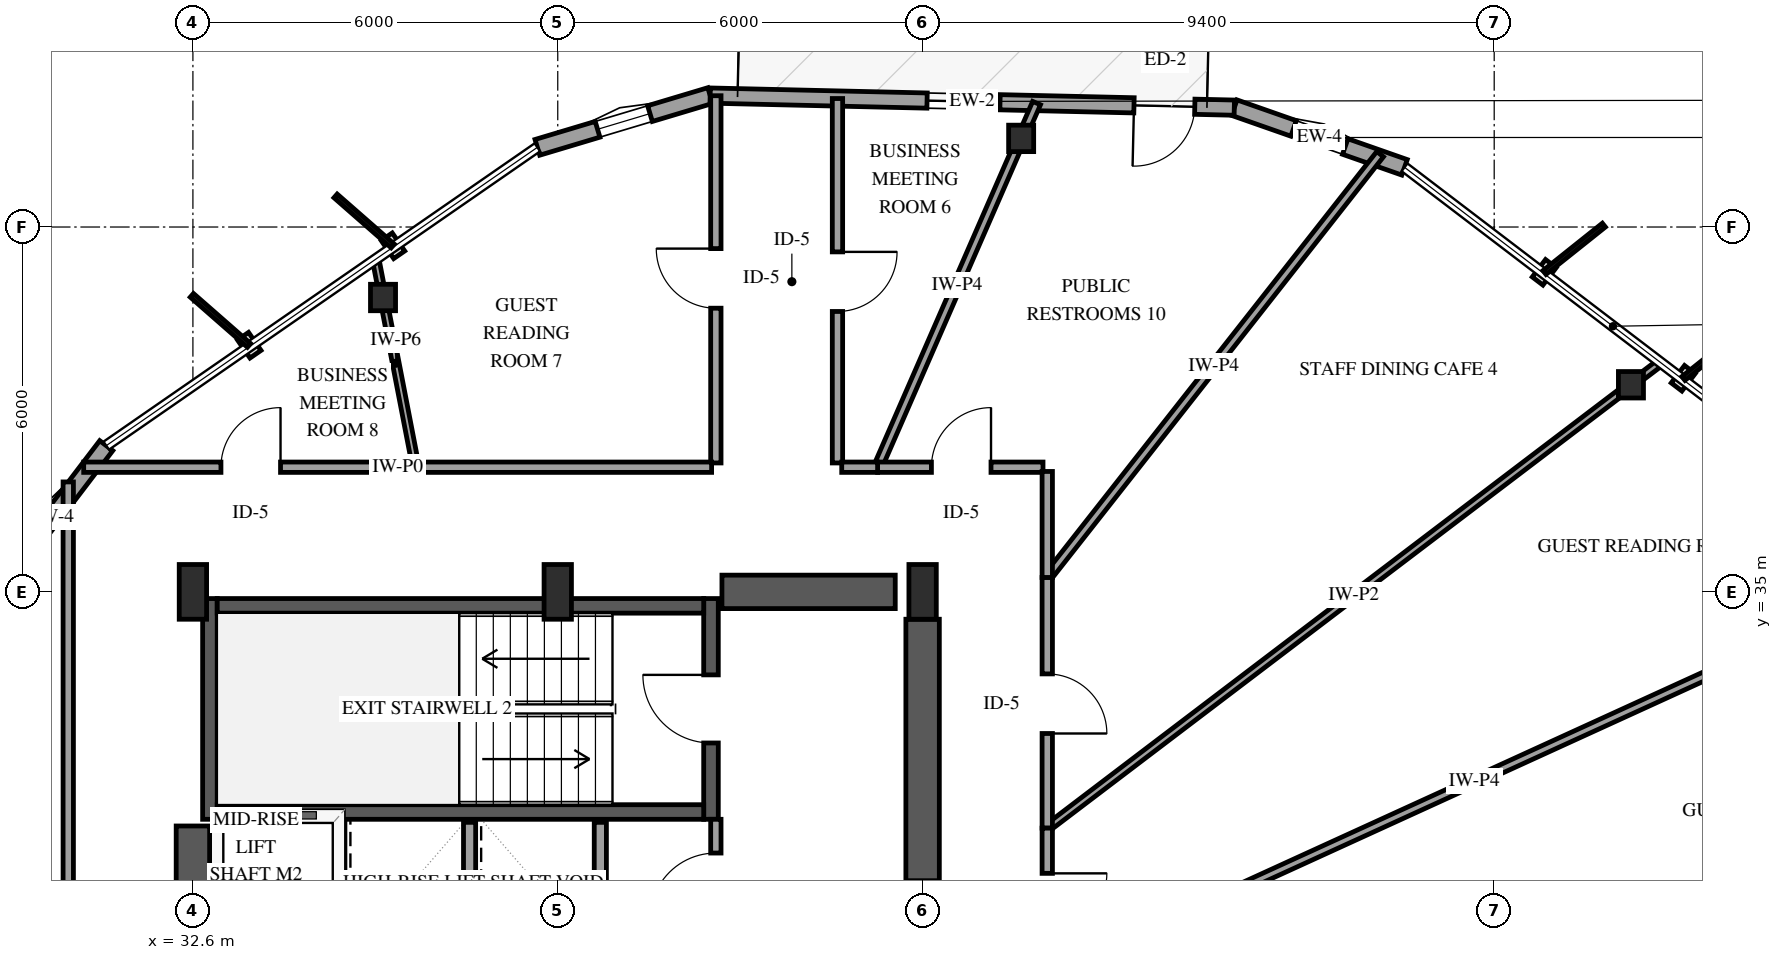
"""IFC4 building model, lengths in metres.
Left out: names, types, materials, properties, quantities, classifications, styles, units other than length and angle.
Written with IfcOpenShell. Run it as: python <this file> out.ifc"""

import sys

from ifc_helpers import new_model, si_unit, direction, frame, frame_2d, origin, origin_2d, place, context, subcontext, project, spatial, rectangle, i_section, extrude, element, fill, save


model = new_model("IFC4")
c1 = context("Model", 3, precision=1e-05, world=origin(), true_north=direction((0.0, 1.0)))
c2 = subcontext(c1, "Body", "Model", "MODEL_VIEW")
j1 = project(units=[si_unit("LENGTHUNIT", "METRE"), si_unit("PLANEANGLEUNIT", "RADIAN")], contexts=[c1])
p1 = place(None, origin())
s1 = spatial("IfcSite", under=j1, at=p1, CompositionType="ELEMENT")
p2 = place(p1, origin())
s2 = spatial("IfcBuilding", under=s1, at=p2, CompositionType="ELEMENT")
p3 = place(p2, frame((0.0, 0.0, 160.6)))
s3 = spatial("IfcBuildingStorey", under=s2, at=p3, CompositionType="ELEMENT", Elevation=160.6)
p4 = place(p3, frame((32.88, 31.26, 0.0), z_axis=(0.0, 0.0, 1.0), x_axis=(0.0, 1.0, 0.0)))
e1 = element("IfcWall", 1, at=p4, inside=s3, PredefinedType="SHEAR", context=c2, shape_type="SweptSolid", body=[
    extrude(rectangle(XDim=3.63, YDim=0.24, at=frame_2d((1.815, 0.0))), origin(), (0.0, 0.0, 1.0), 3.6),
])
p5 = place(p3, frame((41.12, 31.26, 0.0), z_axis=(0.0, 0.0, 1.0), x_axis=(0.0, 1.0, 0.0)))
e2 = element("IfcWall", 2, at=p5, inside=s3, PredefinedType="SHEAR", context=c2, shape_type="SweptSolid", body=[
    extrude(rectangle(XDim=3.63, YDim=0.24, at=frame_2d((1.815, 0.0))), origin(), (0.0, 0.0, 1.0), 3.6),
])
p6 = place(p5, frame((1.255, 0.0, 0.0)))
e3 = element("IfcOpeningElement", 3, at=p6, cuts=e2, PredefinedType="OPENING", context=c2, shape_type="SweptSolid", body=[
    extrude(rectangle(XDim=1.12, YDim=2.15, at=frame_2d((0.56, 1.075))), frame((0.0, 0.13, 0.0), z_axis=(0.0, -1.0, 0.0), x_axis=(1.0, 0.0, 0.0)), (0.0, 0.0, 1.0), 0.26),
])
for number, where, z_axis, x_axis in (
    (4, (33.0, 31.38, 0.0), (0.0, 0.0, 1.0), (1.0, 0.0, 0.0)),
    (5, (33.0, 34.77, 0.0), (0.0, 0.0, 1.0), (1.0, 0.0, 0.0)),
):
    element("IfcWall", number, at=place(p3, frame(where, z_axis=z_axis, x_axis=x_axis)), inside=s3, PredefinedType="SHEAR", context=c2, shape_type="SweptSolid", body=[
        extrude(rectangle(XDim=8.0, YDim=0.24, at=frame_2d((4.0, 0.0))), origin(), (0.0, 0.0, 1.0), 3.6),
    ])
p7 = place(p3, frame((32.6, 18.85, 0.0), z_axis=(0.0, 0.0, 1.0), x_axis=(0.0, 1.0, 0.0)))
e6 = element("IfcWall", 6, at=p7, inside=s3, PredefinedType="SHEAR", context=c2, shape_type="SweptSolid", body=[
    extrude(rectangle(XDim=12.3, YDim=0.55, at=frame_2d((6.15, 0.0))), origin(), (0.0, 0.0, 1.0), 3.6),
])
p8 = place(p3, frame((41.3, 35.0, 0.0), z_axis=(0.0, 0.0, 1.0), x_axis=(1.0, 0.0, 0.0)))
e7 = element("IfcWall", 7, at=p8, inside=s3, PredefinedType="SHEAR", context=c2, shape_type="SweptSolid", body=[
    extrude(rectangle(XDim=2.85, YDim=0.55, at=frame_2d((1.425, 0.0))), origin(), (0.0, 0.0, 1.0), 3.6),
])
p9 = place(p3, frame((44.6, 29.8, 0.0), z_axis=(0.0, 0.0, 1.0), x_axis=(0.0, 1.0, 0.0)))
e8 = element("IfcWall", 8, at=p9, inside=s3, PredefinedType="SHEAR", context=c2, shape_type="SweptSolid", body=[
    extrude(rectangle(XDim=4.75, YDim=0.55, at=frame_2d((2.375, 0.0))), origin(), (0.0, 0.0, 1.0), 3.6),
])
for number, where, z_axis, x_axis in (
    (9, (32.6, 35.0, 0.0), (0.0, 0.0, 1.0), (1.0, 0.0, 0.0)),
    (10, (38.6, 35.0, 0.0), (0.0, 0.0, 1.0), (1.0, 0.0, 0.0)),
    (11, (44.6, 35.0, 0.0), (0.0, 0.0, 1.0), (1.0, 0.0, 0.0)),
):
    element("IfcColumn", number, at=place(p3, frame(where, z_axis=z_axis, x_axis=x_axis)), inside=s3, PredefinedType="PILASTER", context=c2, shape_type="SweptSolid", body=[
        extrude(rectangle(XDim=0.45, YDim=0.9, at=origin_2d()), origin(), (0.0, 0.0, 1.0), 3.6),
    ])
for number, where, z_axis, x_axis in (
    (12, (56.249, 38.406, 0.0), (0.0, 0.0, 1.0), (1.0, 0.0, 0.0)),
    (13, (46.221, 42.458, 0.0), (0.0, 0.0, 1.0), (1.0, 0.0, 0.0)),
    (14, (35.726, 39.841, 0.0), (0.0, 0.0, 1.0), (1.0, 0.0, 0.0)),
):
    element("IfcColumn", number, at=place(p3, frame(where, z_axis=z_axis, x_axis=x_axis)), inside=s3, PredefinedType="COLUMN", context=c2, shape_type="SweptSolid", body=[
        extrude(i_section(OverallWidth=0.412, OverallDepth=0.435, WebThickness=0.036, FlangeThickness=0.057, FilletRadius=0.038, at=origin_2d()), origin(), (0.0, 0.0, 1.0), 3.6),
    ])
p10 = place(p3, frame((52.525, 41.982, 0.0), z_axis=(0.0, 0.0, 1.0), x_axis=(-0.94371585025, 0.330757303755, 0.0)))
e15 = element("IfcWall", 15, at=p10, inside=s3, PredefinedType="SOLIDWALL", context=c2, shape_type="SweptSolid", body=[
    extrude(rectangle(XDim=2.967, YDim=0.27, at=frame_2d((1.483, 0.0))), origin(), (0.0, 0.0, 1.0), 2.679),
])
p11 = place(p10, frame((1.033, 0.0, 0.75)))
e16 = element("IfcOpeningElement", 16, at=p11, cuts=e15, PredefinedType="OPENING", context=c2, shape_type="SweptSolid", body=[
    extrude(rectangle(XDim=0.9, YDim=1.5, at=frame_2d((0.45, 0.75))), frame((0.0, 0.145, 0.0), z_axis=(0.0, -1.0, 0.0), x_axis=(1.0, 0.0, 0.0)), (0.0, 0.0, 1.0), 0.29),
])
p12 = place(p3, frame((41.107, 43.162, 0.0), z_axis=(0.0, 0.0, 1.0), x_axis=(-0.957939463861, -0.286970353134, 0.0)))
e17 = element("IfcWall", 17, at=p12, inside=s3, PredefinedType="SOLIDWALL", context=c2, shape_type="SweptSolid", body=[
    extrude(rectangle(XDim=2.967, YDim=0.27, at=frame_2d((1.483, 0.0))), origin(), (0.0, 0.0, 1.0), 2.679),
])
p13 = place(p12, frame((1.033, 0.0, 0.75)))
e18 = element("IfcOpeningElement", 18, at=p13, cuts=e17, PredefinedType="OPENING", context=c2, shape_type="SweptSolid", body=[
    extrude(rectangle(XDim=0.9, YDim=1.5, at=frame_2d((0.45, 0.75))), frame((0.0, 0.145, 0.0), z_axis=(0.0, -1.0, 0.0), x_axis=(1.0, 0.0, 0.0)), (0.0, 0.0, 1.0), 0.29),
])
p14 = place(p3, frame((49.726, 42.963, 0.0), z_axis=(0.0, 0.0, 1.0), x_axis=(-0.999734296137, 0.023050751106, 0.0)))
e19 = element("IfcWall", 19, at=p14, inside=s3, PredefinedType="SOLIDWALL", context=c2, shape_type="SweptSolid", body=[
    extrude(rectangle(XDim=8.621, YDim=0.25, at=frame_2d((4.311, 0.0))), origin(), (0.0, 0.0, 1.0), 2.679),
])
p15 = place(p14, frame((0.65, 0.0, 0.0)))
e20 = element("IfcOpeningElement", 20, at=p15, cuts=e19, PredefinedType="OPENING", context=c2, shape_type="SweptSolid", body=[
    extrude(rectangle(XDim=1.0, YDim=2.15, at=frame_2d((0.5, 1.075))), frame((0.0, 0.135, 0.0), z_axis=(0.0, -1.0, 0.0), x_axis=(1.0, 0.0, 0.0)), (0.0, 0.0, 1.0), 0.27),
])
p16 = place(p14, frame((3.854, 0.0, 0.72)))
e21 = element("IfcOpeningElement", 21, at=p16, cuts=e19, PredefinedType="OPENING", context=c2, shape_type="SweptSolid", body=[
    extrude(rectangle(XDim=1.2, YDim=1.6, at=frame_2d((0.6, 0.8))), frame((0.0, 0.135, 0.0), z_axis=(0.0, -1.0, 0.0), x_axis=(1.0, 0.0, 0.0)), (0.0, 0.0, 1.0), 0.27),
])
p17 = place(p3, frame((31.175, 37.405, 0.0), z_axis=(0.0, 0.0, 1.0), x_axis=(-0.606288663224, -0.795244652196, 0.0)))
e22 = element("IfcWall", 22, at=p17, inside=s3, PredefinedType="SOLIDWALL", context=c2, shape_type="SweptSolid", body=[
    extrude(rectangle(XDim=2.967, YDim=0.27, at=frame_2d((1.483, 0.0))), origin(), (0.0, 0.0, 1.0), 2.679),
])
for number, where, z_axis, x_axis in (
    (23, (35.0, 29.11, 0.0), (0.0, 0.0, 1.0), (0.0, 1.0, 0.0)),
    (24, (37.15, 29.11, 0.0), (0.0, 0.0, 1.0), (0.0, 1.0, 0.0)),
    (25, (39.3, 29.11, 0.0), (0.0, 0.0, 1.0), (0.0, 1.0, 0.0)),
):
    element("IfcWall", number, at=place(p3, frame(where, z_axis=z_axis, x_axis=x_axis)), inside=s3, PredefinedType="SOLIDWALL", context=c2, shape_type="SweptSolid", body=[
        extrude(rectangle(XDim=2.1, YDim=0.2, at=frame_2d((1.05, 0.0))), origin(), (0.0, 0.0, 1.0), 3.3),
    ])
p18 = place(p3, frame((46.65, 28.677, 0.0), z_axis=(0.0, 0.0, 1.0), x_axis=(0.909587862055, 0.415511637866, 0.0)))
e26 = element("IfcWall", 26, at=p18, inside=s3, PredefinedType="PARTITIONING", context=c2, shape_type="SweptSolid", body=[
    extrude(rectangle(XDim=15.441, YDim=0.14, at=frame_2d((7.721, 0.0))), origin(), (0.0, 0.0, 1.0), 3.3),
])
p19 = place(p3, frame((46.65, 31.115, 0.0), z_axis=(0.0, 0.0, 1.0), x_axis=(0.796320074683, 0.604875473678, 0.0)))
e27 = element("IfcWall", 27, at=p19, inside=s3, PredefinedType="PARTITIONING", context=c2, shape_type="SweptSolid", body=[
    extrude(rectangle(XDim=12.662, YDim=0.12, at=frame_2d((6.331, 0.0))), origin(), (0.0, 0.0, 1.0), 3.3),
])
p20 = place(p3, frame((30.55, 25.603, 0.0), z_axis=(0.0, 0.0, 1.0), x_axis=(0.0, 1.0, 0.0)))
e28 = element("IfcWall", 28, at=p20, inside=s3, PredefinedType="PARTITIONING", context=c2, shape_type="SweptSolid", body=[
    extrude(rectangle(XDim=11.205, YDim=0.17, at=frame_2d((5.603, 0.0))), origin(), (0.0, 0.0, 1.0), 3.3),
])
p21 = place(p20, frame((1.206, 0.0, 0.0)))
e29 = element("IfcOpeningElement", 29, at=p21, cuts=e28, PredefinedType="OPENING", context=c2, shape_type="SweptSolid", body=[
    extrude(rectangle(XDim=0.98, YDim=2.15, at=frame_2d((0.49, 1.075))), frame((0.0, 0.095, 0.0), z_axis=(0.0, -1.0, 0.0), x_axis=(1.0, 0.0, 0.0)), (0.0, 0.0, 1.0), 0.19),
])
p22 = place(p3, frame((46.65, 35.237, 0.0), z_axis=(0.0, 0.0, 1.0), x_axis=(0.618157544568, 0.786054228469, 0.0)))
e30 = element("IfcWall", 30, at=p22, inside=s3, PredefinedType="PARTITIONING", context=c2, shape_type="SweptSolid", body=[
    extrude(rectangle(XDim=8.855, YDim=0.14, at=frame_2d((4.428, 0.0))), origin(), (0.0, 0.0, 1.0), 2.678),
])
p23 = place(p3, frame((43.86, 37.05, 0.0), z_axis=(0.0, 0.0, 1.0), x_axis=(0.400079710806, 0.916480346217, 0.0)))
e31 = element("IfcWall", 31, at=p23, inside=s3, PredefinedType="PARTITIONING", context=c2, shape_type="SweptSolid", body=[
    extrude(rectangle(XDim=6.534, YDim=0.14, at=frame_2d((3.267, 0.0))), origin(), (0.0, 0.0, 1.0), 2.595),
])
p24 = place(p3, frame((41.2, 37.12, 0.0), z_axis=(0.0, 0.0, 1.0), x_axis=(0.0, 1.0, 0.0)))
e32 = element("IfcWall", 32, at=p24, inside=s3, PredefinedType="PARTITIONING", context=c2, shape_type="SweptSolid", body=[
    extrude(rectangle(XDim=6.039, YDim=0.17, at=frame_2d((3.02, 0.0))), origin(), (0.0, 0.0, 1.0), 2.678),
])
p25 = place(p24, frame((2.545, 0.0, 0.0)))
e33 = element("IfcOpeningElement", 33, at=p25, cuts=e32, PredefinedType="OPENING", context=c2, shape_type="SweptSolid", body=[
    extrude(rectangle(XDim=0.98, YDim=2.15, at=frame_2d((0.49, 1.075))), frame((0.0, 0.095, 0.0), z_axis=(0.0, -1.0, 0.0), x_axis=(1.0, 0.0, 0.0)), (0.0, 0.0, 1.0), 0.19),
])
p26 = place(p3, frame((43.2, 43.113, 0.0), z_axis=(0.0, 0.0, 1.0), x_axis=(0.0, -1.0, 0.0)))
e34 = element("IfcWall", 34, at=p26, inside=s3, PredefinedType="PARTITIONING", context=c2, shape_type="SweptSolid", body=[
    extrude(rectangle(XDim=5.993, YDim=0.17, at=frame_2d((2.997, 0.0))), origin(), (0.0, 0.0, 1.0), 2.674),
])
p27 = place(p26, frame((2.522, 0.0, 0.0)))
e35 = element("IfcOpeningElement", 35, at=p27, cuts=e34, PredefinedType="OPENING", context=c2, shape_type="SweptSolid", body=[
    extrude(rectangle(XDim=0.98, YDim=2.15, at=frame_2d((0.49, 1.075))), frame((0.0, 0.095, 0.0), z_axis=(0.0, -1.0, 0.0), x_axis=(1.0, 0.0, 0.0)), (0.0, 0.0, 1.0), 0.19),
])
p28 = place(p3, frame((30.804, 37.05, 0.0), z_axis=(0.0, 0.0, 1.0), x_axis=(1.0, 0.0, 0.0)))
e36 = element("IfcWall", 36, at=p28, inside=s3, PredefinedType="PARTITIONING", context=c2, shape_type="SweptSolid", body=[
    extrude(rectangle(XDim=5.463, YDim=0.17, at=frame_2d((2.731, 0.0))), origin(), (0.0, 0.0, 1.0), 3.3),
])
p29 = place(p28, frame((2.257, 0.0, 0.0)))
e37 = element("IfcOpeningElement", 37, at=p29, cuts=e36, PredefinedType="OPENING", context=c2, shape_type="SweptSolid", body=[
    extrude(rectangle(XDim=0.98, YDim=2.15, at=frame_2d((0.49, 1.075))), frame((0.0, 0.095, 0.0), z_axis=(0.0, -1.0, 0.0), x_axis=(1.0, 0.0, 0.0)), (0.0, 0.0, 1.0), 0.19),
])
p30 = place(p3, frame((36.267, 37.05, 0.0), z_axis=(0.0, 0.0, 1.0), x_axis=(1.0, 0.0, 0.0)))
e38 = element("IfcWall", 38, at=p30, inside=s3, PredefinedType="PARTITIONING", context=c2, shape_type="SweptSolid", body=[
    extrude(rectangle(XDim=4.863, YDim=0.17, at=frame_2d((2.431, 0.0))), origin(), (0.0, 0.0, 1.0), 3.3),
])
p31 = place(p3, frame((46.65, 35.237, 0.0), z_axis=(0.0, 0.0, 1.0), x_axis=(0.0, -1.0, 0.0)))
e39 = element("IfcWall", 39, at=p31, inside=s3, PredefinedType="PARTITIONING", context=c2, shape_type="SweptSolid", body=[
    extrude(rectangle(XDim=4.122, YDim=0.17, at=frame_2d((2.061, 0.0))), origin(), (0.0, 0.0, 1.0), 3.3),
])
p32 = place(p31, frame((1.586, 0.0, 0.0)))
e40 = element("IfcOpeningElement", 40, at=p32, cuts=e39, PredefinedType="OPENING", context=c2, shape_type="SweptSolid", body=[
    extrude(rectangle(XDim=0.98, YDim=2.15, at=frame_2d((0.49, 1.075))), frame((0.0, 0.095, 0.0), z_axis=(0.0, -1.0, 0.0), x_axis=(1.0, 0.0, 0.0)), (0.0, 0.0, 1.0), 0.19),
])
p33 = place(p3, frame((36.267, 37.05, 0.0), z_axis=(0.0, 0.0, 1.0), x_axis=(-0.190074207451, 0.981769726393, 0.0)))
e41 = element("IfcWall", 41, at=p33, inside=s3, PredefinedType="PARTITIONING", context=c2, shape_type="SweptSolid", body=[
    extrude(rectangle(XDim=3.483, YDim=0.11, at=frame_2d((1.742, 0.0))), origin(), (0.0, 0.0, 1.0), 2.595),
])
p34 = place(p3, frame((43.86, 37.05, 0.0), z_axis=(0.0, 0.0, 1.0), x_axis=(1.0, 0.0, 0.0)))
e42 = element("IfcWall", 42, at=p34, inside=s3, PredefinedType="PARTITIONING", context=c2, shape_type="SweptSolid", body=[
    extrude(rectangle(XDim=2.72, YDim=0.17, at=frame_2d((1.36, 0.0))), origin(), (0.0, 0.0, 1.0), 3.3),
])
p35 = place(p34, frame((0.885, 0.0, 0.0)))
e43 = element("IfcOpeningElement", 43, at=p35, cuts=e42, PredefinedType="OPENING", context=c2, shape_type="SweptSolid", body=[
    extrude(rectangle(XDim=0.98, YDim=2.15, at=frame_2d((0.49, 1.075))), frame((0.0, 0.095, 0.0), z_axis=(0.0, -1.0, 0.0), x_axis=(1.0, 0.0, 0.0)), (0.0, 0.0, 1.0), 0.19),
])
p36 = place(p3, frame((46.65, 31.115, 0.0), z_axis=(0.0, 0.0, 1.0), x_axis=(0.0, -1.0, 0.0)))
e44 = element("IfcWall", 44, at=p36, inside=s3, PredefinedType="PARTITIONING", context=c2, shape_type="SweptSolid", body=[
    extrude(rectangle(XDim=2.438, YDim=0.17, at=frame_2d((1.219, 0.0))), origin(), (0.0, 0.0, 1.0), 3.3),
])
p37 = place(p36, frame((0.744, 0.0, 0.0)))
e45 = element("IfcOpeningElement", 45, at=p37, cuts=e44, PredefinedType="OPENING", context=c2, shape_type="SweptSolid", body=[
    extrude(rectangle(XDim=0.98, YDim=2.15, at=frame_2d((0.49, 1.075))), frame((0.0, 0.095, 0.0), z_axis=(0.0, -1.0, 0.0), x_axis=(1.0, 0.0, 0.0)), (0.0, 0.0, 1.0), 0.19),
])
p38 = place(p3, frame((41.2, 29.07, 0.0), z_axis=(0.0, 0.0, 1.0), x_axis=(0.0, 1.0, 0.0)))
e46 = element("IfcWall", 46, at=p38, inside=s3, PredefinedType="PARTITIONING", context=c2, shape_type="SweptSolid", body=[
    extrude(rectangle(XDim=2.19, YDim=0.17, at=frame_2d((1.095, 0.0))), origin(), (0.0, 0.0, 1.0), 3.3),
])
p39 = place(p38, frame((0.555, 0.0, 0.0)))
e47 = element("IfcOpeningElement", 47, at=p39, cuts=e46, PredefinedType="OPENING", context=c2, shape_type="SweptSolid", body=[
    extrude(rectangle(XDim=1.08, YDim=2.15, at=frame_2d((0.54, 1.075))), frame((0.0, 0.095, 0.0), z_axis=(0.0, -1.0, 0.0), x_axis=(1.0, 0.0, 0.0)), (0.0, 0.0, 1.0), 0.19),
])
p40 = place(p3, frame((46.65, 36.98, 0.0), z_axis=(0.0, 0.0, 1.0), x_axis=(0.0, -1.0, 0.0)))
e48 = element("IfcWall", 48, at=p40, inside=s3, PredefinedType="PARTITIONING", context=c2, shape_type="SweptSolid", body=[
    extrude(rectangle(XDim=1.743, YDim=0.17, at=frame_2d((0.872, 0.0))), origin(), (0.0, 0.0, 1.0), 3.3),
])
p41 = place(p3, frame((43.27, 37.05, 0.0), z_axis=(0.0, 0.0, 1.0), x_axis=(1.0, 0.0, 0.0)))
e49 = element("IfcWall", 49, at=p41, inside=s3, PredefinedType="PARTITIONING", context=c2, shape_type="SweptSolid", body=[
    extrude(rectangle(XDim=0.59, YDim=0.17, at=frame_2d((0.295, 0.0))), origin(), (0.0, 0.0, 1.0), 3.3),
])
p42 = place(p11, origin())
e50 = element("IfcWindow", 50, at=p42, inside=s3, PartitioningType="SINGLE_PANEL", PredefinedType="WINDOW", context=c2, shape_type="SweptSolid", body=[
    extrude(rectangle(XDim=0.9, YDim=1.5, at=frame_2d((0.45, 0.75))), frame((0.0, 0.03, 0.0), z_axis=(0.0, -1.0, 0.0), x_axis=(1.0, 0.0, 0.0)), (0.0, 0.0, 1.0), 0.06),
])
fill(e16, e50)
p43 = place(p13, origin())
e51 = element("IfcWindow", 51, at=p43, inside=s3, PartitioningType="SINGLE_PANEL", PredefinedType="WINDOW", context=c2, shape_type="SweptSolid", body=[
    extrude(rectangle(XDim=0.9, YDim=1.5, at=frame_2d((0.45, 0.75))), frame((0.0, 0.03, 0.0), z_axis=(0.0, -1.0, 0.0), x_axis=(1.0, 0.0, 0.0)), (0.0, 0.0, 1.0), 0.06),
])
fill(e18, e51)
p44 = place(p15, origin())
e52 = element("IfcDoor", 52, at=p44, inside=s3, OperationType="SINGLE_SWING_RIGHT", PredefinedType="DOOR", context=c2, shape_type="SweptSolid", body=[
    extrude(rectangle(XDim=1.0, YDim=2.15, at=frame_2d((0.5, 1.075))), frame((0.0, 0.025, 0.0), z_axis=(0.0, -1.0, 0.0), x_axis=(1.0, 0.0, 0.0)), (0.0, 0.0, 1.0), 0.05),
])
fill(e20, e52)
p45 = place(p16, origin())
e53 = element("IfcWindow", 53, at=p45, inside=s3, PartitioningType="SINGLE_PANEL", PredefinedType="WINDOW", context=c2, shape_type="SweptSolid", body=[
    extrude(rectangle(XDim=1.2, YDim=1.6, at=frame_2d((0.6, 0.8))), frame((0.0, 0.03, 0.0), z_axis=(0.0, -1.0, 0.0), x_axis=(1.0, 0.0, 0.0)), (0.0, 0.0, 1.0), 0.06),
])
fill(e21, e53)
p46 = place(p6, origin())
e54 = element("IfcDoor", 54, at=p46, inside=s3, OperationType="SINGLE_SWING_RIGHT", PredefinedType="DOOR", context=c2, shape_type="SweptSolid", body=[
    extrude(rectangle(XDim=1.12, YDim=2.15, at=frame_2d((0.56, 1.075))), frame((0.0, 0.025, 0.0), z_axis=(0.0, -1.0, 0.0), x_axis=(1.0, 0.0, 0.0)), (0.0, 0.0, 1.0), 0.05),
])
fill(e3, e54)
p47 = place(p25, origin())
e55 = element("IfcDoor", 55, at=p47, inside=s3, OperationType="SINGLE_SWING_RIGHT", PredefinedType="DOOR", context=c2, shape_type="SweptSolid", body=[
    extrude(rectangle(XDim=0.98, YDim=2.15, at=frame_2d((0.49, 1.075))), frame((0.0, 0.025, 0.0), z_axis=(0.0, -1.0, 0.0), x_axis=(1.0, 0.0, 0.0)), (0.0, 0.0, 1.0), 0.05),
])
fill(e33, e55)
p48 = place(p27, origin())
e56 = element("IfcDoor", 56, at=p48, inside=s3, OperationType="SINGLE_SWING_LEFT", PredefinedType="DOOR", context=c2, shape_type="SweptSolid", body=[
    extrude(rectangle(XDim=0.98, YDim=2.15, at=frame_2d((0.49, 1.075))), frame((0.0, 0.025, 0.0), z_axis=(0.0, -1.0, 0.0), x_axis=(1.0, 0.0, 0.0)), (0.0, 0.0, 1.0), 0.05),
])
fill(e35, e56)
p49 = place(p29, origin())
e57 = element("IfcDoor", 57, at=p49, inside=s3, OperationType="SINGLE_SWING_RIGHT", PredefinedType="DOOR", context=c2, shape_type="SweptSolid", body=[
    extrude(rectangle(XDim=0.98, YDim=2.15, at=frame_2d((0.49, 1.075))), frame((0.0, 0.025, 0.0), z_axis=(0.0, -1.0, 0.0), x_axis=(1.0, 0.0, 0.0)), (0.0, 0.0, 1.0), 0.05),
])
fill(e37, e57)
p50 = place(p32, origin())
e58 = element("IfcDoor", 58, at=p50, inside=s3, OperationType="SINGLE_SWING_RIGHT", PredefinedType="DOOR", context=c2, shape_type="SweptSolid", body=[
    extrude(rectangle(XDim=0.98, YDim=2.15, at=frame_2d((0.49, 1.075))), frame((0.0, 0.025, 0.0), z_axis=(0.0, -1.0, 0.0), x_axis=(1.0, 0.0, 0.0)), (0.0, 0.0, 1.0), 0.05),
])
fill(e40, e58)
p51 = place(p35, origin())
e59 = element("IfcDoor", 59, at=p51, inside=s3, OperationType="SINGLE_SWING_RIGHT", PredefinedType="DOOR", context=c2, shape_type="SweptSolid", body=[
    extrude(rectangle(XDim=0.98, YDim=2.15, at=frame_2d((0.49, 1.075))), frame((0.0, 0.025, 0.0), z_axis=(0.0, -1.0, 0.0), x_axis=(1.0, 0.0, 0.0)), (0.0, 0.0, 1.0), 0.05),
])
fill(e43, e59)
p52 = place(p37, origin())
e60 = element("IfcDoor", 60, at=p52, inside=s3, OperationType="SINGLE_SWING_LEFT", PredefinedType="DOOR", context=c2, shape_type="SweptSolid", body=[
    extrude(rectangle(XDim=0.98, YDim=2.15, at=frame_2d((0.49, 1.075))), frame((0.0, 0.025, 0.0), z_axis=(0.0, -1.0, 0.0), x_axis=(1.0, 0.0, 0.0)), (0.0, 0.0, 1.0), 0.05),
])
fill(e45, e60)
p53 = place(p39, origin())
e61 = element("IfcDoor", 61, at=p53, inside=s3, OperationType="SINGLE_SWING_LEFT", PredefinedType="DOOR", context=c2, shape_type="SweptSolid", body=[
    extrude(rectangle(XDim=1.08, YDim=2.15, at=frame_2d((0.54, 1.075))), frame((0.0, 0.025, 0.0), z_axis=(0.0, -1.0, 0.0), x_axis=(1.0, 0.0, 0.0)), (0.0, 0.0, 1.0), 0.05),
])
fill(e47, e61)
save(model, sys.argv[1])
